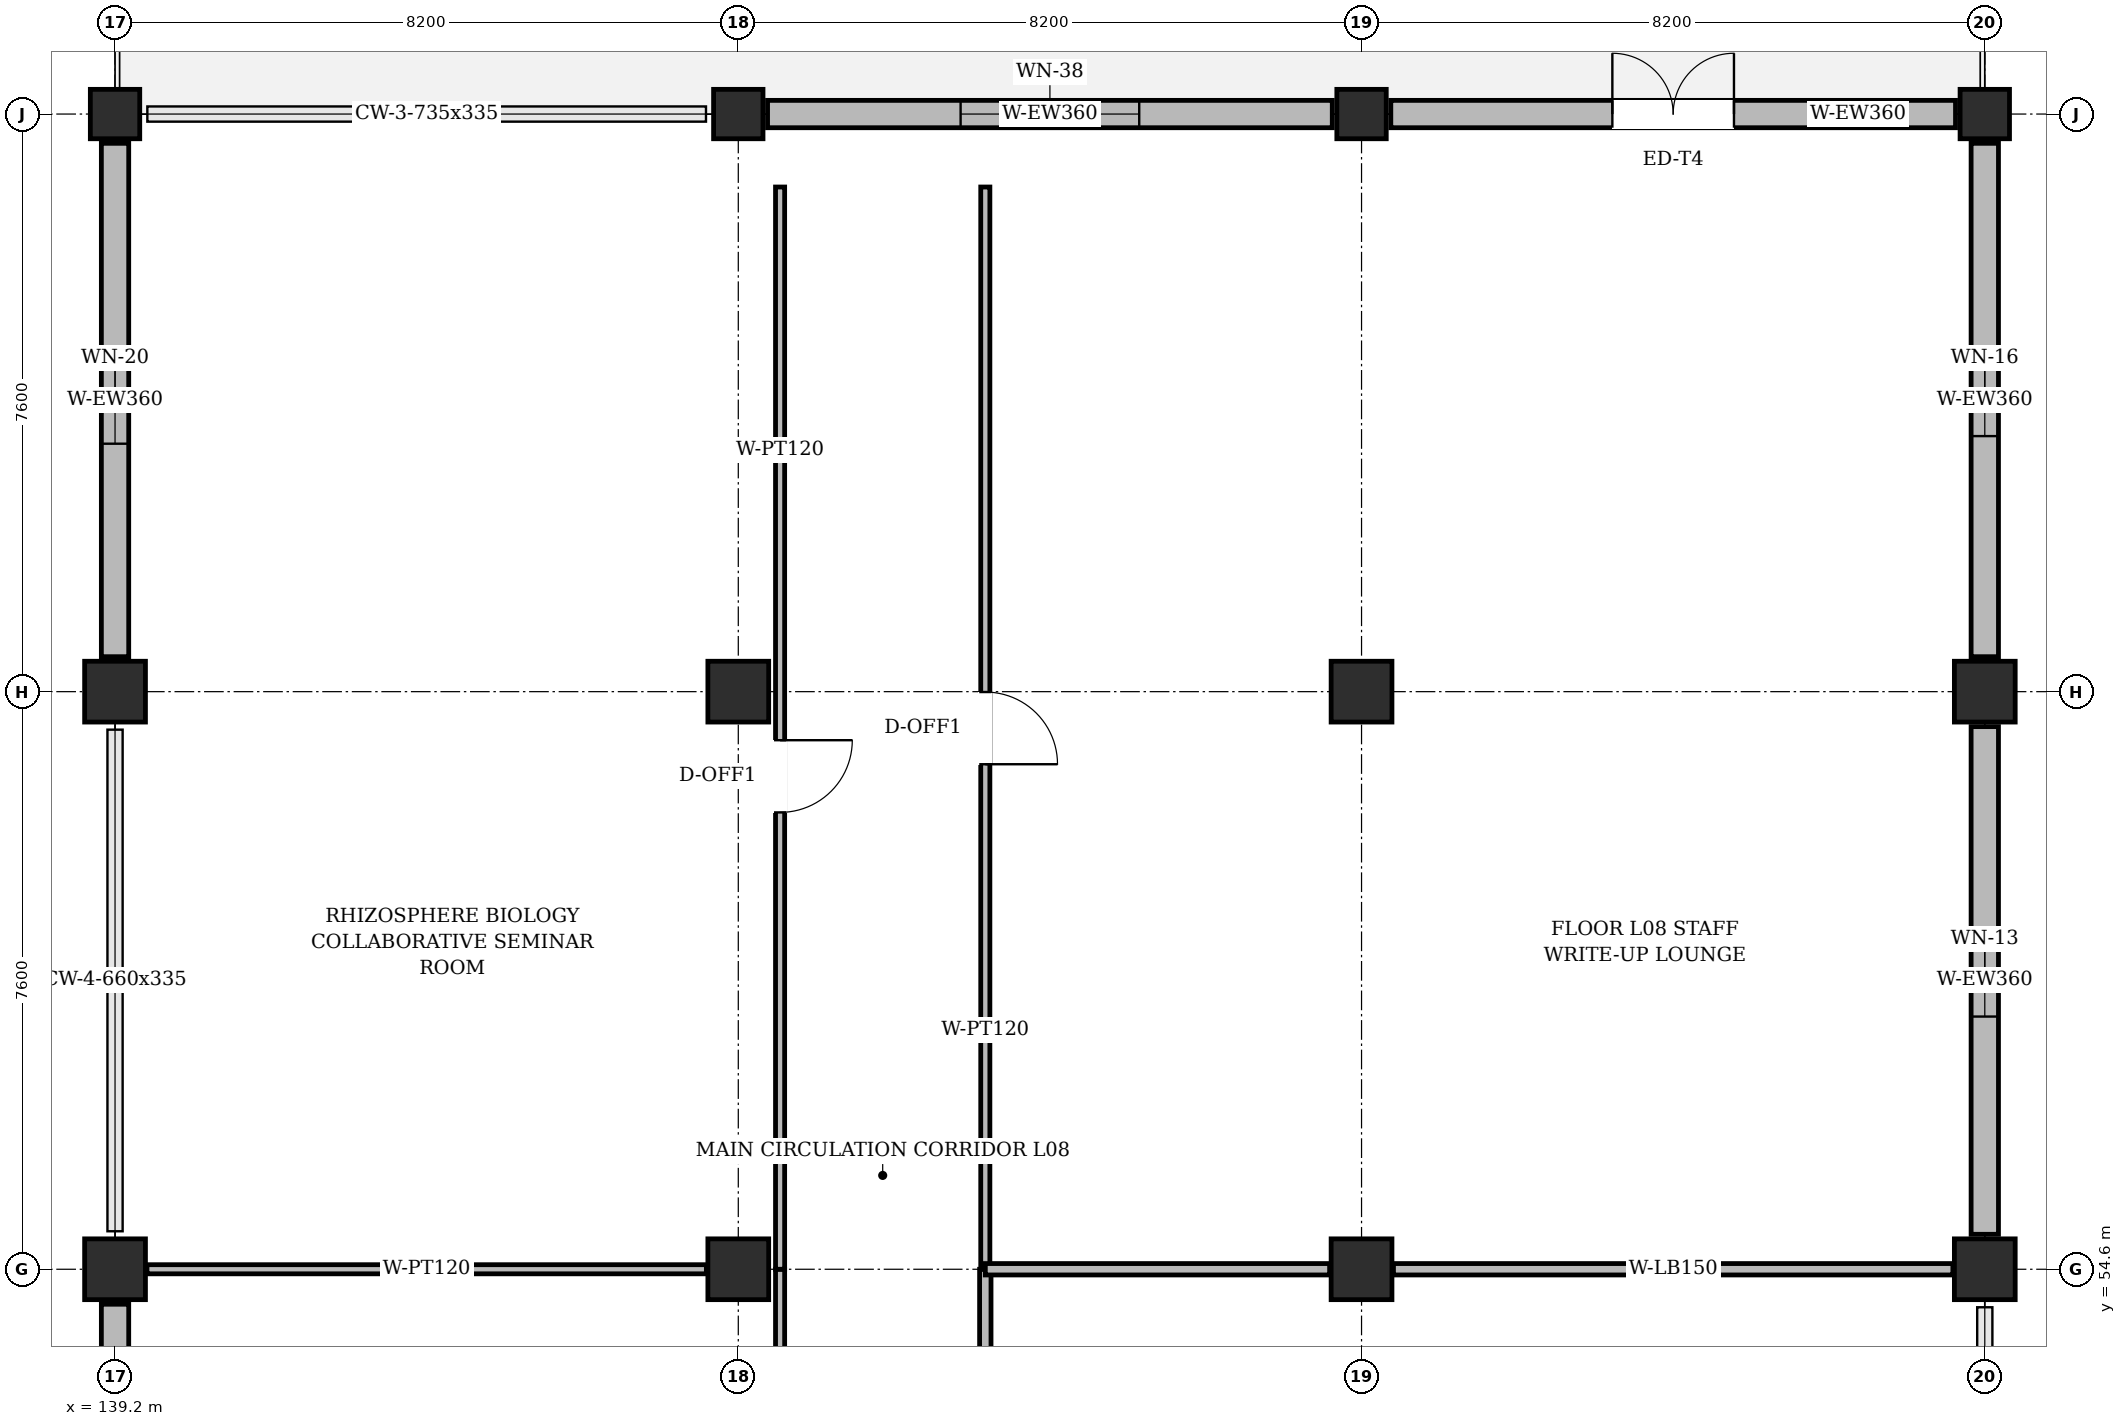
"""IFC4 building model, lengths in metres.
Left out: names, types, materials, properties, quantities, classifications, styles, units other than length and angle.
Written with IfcOpenShell. Run it as: python <this file> out.ifc"""

import sys

from ifc_helpers import new_model, si_unit, direction, frame, frame_2d, origin, origin_2d, place, context, subcontext, project, spatial, rectangle, extrude, element, fill, save


model = new_model("IFC4")
c1 = context("Model", 3, precision=1e-05, world=origin(), true_north=direction((0.0, 1.0)))
c2 = subcontext(c1, "Body", "Model", "MODEL_VIEW")
j1 = project(units=[si_unit("LENGTHUNIT", "METRE"), si_unit("PLANEANGLEUNIT", "RADIAN")], contexts=[c1])
p1 = place(None, origin())
s1 = spatial("IfcSite", under=j1, at=p1, CompositionType="ELEMENT")
p2 = place(p1, origin())
s2 = spatial("IfcBuilding", under=s1, at=p2, CompositionType="ELEMENT")
p3 = place(p2, frame((0.0, 0.0, 36.6)))
s3 = spatial("IfcBuildingStorey", under=s2, at=p3, CompositionType="ELEMENT", Elevation=36.6)
for number, where, z_axis, x_axis in (
    (1, (139.2, 54.6, 0.0), (0.0, 0.0, 1.0), (1.0, 0.0, 0.0)),
    (2, (139.2, 62.2, 0.0), (0.0, 0.0, 1.0), (1.0, 0.0, 0.0)),
):
    element("IfcColumn", number, at=place(p3, frame(where, z_axis=z_axis, x_axis=x_axis)), inside=s3, PredefinedType="COLUMN", context=c2, shape_type="SweptSolid", body=[
        extrude(rectangle(XDim=0.8, YDim=0.8, at=origin_2d()), origin(), (0.0, 0.0, 1.0), 3.95),
    ])
p4 = place(p3, frame((139.2, 69.8, 0.0), z_axis=(0.0, 0.0, 1.0), x_axis=(1.0, 0.0, 0.0)))
e3 = element("IfcColumn", 3, at=p4, inside=s3, PredefinedType="COLUMN", context=c2, shape_type="SweptSolid", body=[
    extrude(rectangle(XDim=0.65, YDim=0.65, at=origin_2d()), origin(), (0.0, 0.0, 1.0), 3.95),
])
for number, where, z_axis, x_axis in (
    (4, (147.4, 54.6, 0.0), (0.0, 0.0, 1.0), (1.0, 0.0, 0.0)),
    (5, (147.4, 62.2, 0.0), (0.0, 0.0, 1.0), (1.0, 0.0, 0.0)),
):
    element("IfcColumn", number, at=place(p3, frame(where, z_axis=z_axis, x_axis=x_axis)), inside=s3, PredefinedType="COLUMN", context=c2, shape_type="SweptSolid", body=[
        extrude(rectangle(XDim=0.8, YDim=0.8, at=origin_2d()), origin(), (0.0, 0.0, 1.0), 3.95),
    ])
p5 = place(p3, frame((147.4, 69.8, 0.0), z_axis=(0.0, 0.0, 1.0), x_axis=(1.0, 0.0, 0.0)))
e6 = element("IfcColumn", 6, at=p5, inside=s3, PredefinedType="COLUMN", context=c2, shape_type="SweptSolid", body=[
    extrude(rectangle(XDim=0.65, YDim=0.65, at=origin_2d()), origin(), (0.0, 0.0, 1.0), 3.95),
])
for number, where, z_axis, x_axis in (
    (7, (155.6, 54.6, 0.0), (0.0, 0.0, 1.0), (1.0, 0.0, 0.0)),
    (8, (155.6, 62.2, 0.0), (0.0, 0.0, 1.0), (1.0, 0.0, 0.0)),
):
    element("IfcColumn", number, at=place(p3, frame(where, z_axis=z_axis, x_axis=x_axis)), inside=s3, PredefinedType="COLUMN", context=c2, shape_type="SweptSolid", body=[
        extrude(rectangle(XDim=0.8, YDim=0.8, at=origin_2d()), origin(), (0.0, 0.0, 1.0), 3.95),
    ])
p6 = place(p3, frame((155.6, 69.8, 0.0), z_axis=(0.0, 0.0, 1.0), x_axis=(1.0, 0.0, 0.0)))
e9 = element("IfcColumn", 9, at=p6, inside=s3, PredefinedType="COLUMN", context=c2, shape_type="SweptSolid", body=[
    extrude(rectangle(XDim=0.65, YDim=0.65, at=origin_2d()), origin(), (0.0, 0.0, 1.0), 3.95),
])
for number, where, z_axis, x_axis in (
    (10, (163.8, 54.6, 0.0), (0.0, 0.0, 1.0), (1.0, 0.0, 0.0)),
    (11, (163.8, 62.2, 0.0), (0.0, 0.0, 1.0), (1.0, 0.0, 0.0)),
):
    element("IfcColumn", number, at=place(p3, frame(where, z_axis=z_axis, x_axis=x_axis)), inside=s3, PredefinedType="COLUMN", context=c2, shape_type="SweptSolid", body=[
        extrude(rectangle(XDim=0.8, YDim=0.8, at=origin_2d()), origin(), (0.0, 0.0, 1.0), 3.95),
    ])
p7 = place(p3, frame((163.8, 69.8, 0.0), z_axis=(0.0, 0.0, 1.0), x_axis=(1.0, 0.0, 0.0)))
e12 = element("IfcColumn", 12, at=p7, inside=s3, PredefinedType="COLUMN", context=c2, shape_type="SweptSolid", body=[
    extrude(rectangle(XDim=0.65, YDim=0.65, at=origin_2d()), origin(), (0.0, 0.0, 1.0), 3.95),
])
p8 = place(p3, frame((163.8, 55.06, 0.0), z_axis=(0.0, 0.0, 1.0), x_axis=(0.0, 1.0, 0.0)))
e13 = element("IfcWall", 13, at=p8, inside=s3, PredefinedType="SOLIDWALL", context=c2, shape_type="SweptSolid", body=[
    extrude(rectangle(XDim=6.68, YDim=0.36, at=frame_2d((3.34, 0.0))), origin(), (0.0, 0.0, 1.0), 3.335),
])
p9 = place(p8, frame((2.865, 0.0, 0.95)))
e14 = element("IfcOpeningElement", 14, at=p9, cuts=e13, PredefinedType="OPENING", context=c2, shape_type="SweptSolid", body=[
    extrude(rectangle(XDim=0.95, YDim=1.25, at=frame_2d((0.475, 0.625))), frame((0.0, 0.192, 0.0), z_axis=(0.0, -1.0, 0.0), x_axis=(1.0, 0.0, 0.0)), (0.0, 0.0, 1.0), 0.384),
])
p10 = place(p3, frame((163.8, 62.66, 0.0), z_axis=(0.0, 0.0, 1.0), x_axis=(0.0, 1.0, 0.0)))
e15 = element("IfcWall", 15, at=p10, inside=s3, PredefinedType="SOLIDWALL", context=c2, shape_type="SweptSolid", body=[
    extrude(rectangle(XDim=6.755, YDim=0.36, at=frame_2d((3.377, 0.0))), origin(), (0.0, 0.0, 1.0), 3.335),
])
p11 = place(p10, frame((2.903, 0.0, 0.95)))
e16 = element("IfcOpeningElement", 16, at=p11, cuts=e15, PredefinedType="OPENING", context=c2, shape_type="SweptSolid", body=[
    extrude(rectangle(XDim=0.95, YDim=2.05, at=frame_2d((0.475, 1.025))), frame((0.0, 0.192, 0.0), z_axis=(0.0, -1.0, 0.0), x_axis=(1.0, 0.0, 0.0)), (0.0, 0.0, 1.0), 0.384),
])
p12 = place(p3, frame((163.415, 69.8, 0.0), z_axis=(0.0, 0.0, 1.0), x_axis=(-1.0, 0.0, 0.0)))
e17 = element("IfcWall", 17, at=p12, inside=s3, PredefinedType="SOLIDWALL", context=c2, shape_type="SweptSolid", body=[
    extrude(rectangle(XDim=7.43, YDim=0.36, at=frame_2d((3.715, 0.0))), origin(), (0.0, 0.0, 1.0), 3.335),
])
p13 = place(p12, frame((2.915, 0.0, 0.0)))
e18 = element("IfcOpeningElement", 18, at=p13, cuts=e17, PredefinedType="OPENING", context=c2, shape_type="SweptSolid", body=[
    extrude(rectangle(XDim=1.6, YDim=2.2, at=frame_2d((0.8, 1.1))), frame((0.0, 0.192, 0.0), z_axis=(0.0, -1.0, 0.0), x_axis=(1.0, 0.0, 0.0)), (0.0, 0.0, 1.0), 0.384),
])
p14 = place(p3, frame((155.215, 69.8, 0.0), z_axis=(0.0, 0.0, 1.0), x_axis=(-1.0, 0.0, 0.0)))
e19 = element("IfcWall", 19, at=p14, inside=s3, PredefinedType="SOLIDWALL", context=c2, shape_type="SweptSolid", body=[
    extrude(rectangle(XDim=7.43, YDim=0.36, at=frame_2d((3.715, 0.0))), origin(), (0.0, 0.0, 1.0), 3.335),
])
p15 = place(p14, frame((2.54, 0.0, 0.95)))
e20 = element("IfcOpeningElement", 20, at=p15, cuts=e19, PredefinedType="OPENING", context=c2, shape_type="SweptSolid", body=[
    extrude(rectangle(XDim=2.35, YDim=1.5, at=frame_2d((1.175, 0.75))), frame((0.0, 0.192, 0.0), z_axis=(0.0, -1.0, 0.0), x_axis=(1.0, 0.0, 0.0)), (0.0, 0.0, 1.0), 0.384),
])
p16 = place(p3, frame((139.2, 69.415, 0.0), z_axis=(0.0, 0.0, 1.0), x_axis=(0.0, -1.0, 0.0)))
e21 = element("IfcWall", 21, at=p16, inside=s3, PredefinedType="SOLIDWALL", context=c2, shape_type="SweptSolid", body=[
    extrude(rectangle(XDim=6.755, YDim=0.36, at=frame_2d((3.377, 0.0))), origin(), (0.0, 0.0, 1.0), 3.335),
])
p17 = place(p16, frame((2.802, 0.0, 0.95)))
e22 = element("IfcOpeningElement", 22, at=p17, cuts=e21, PredefinedType="OPENING", context=c2, shape_type="SweptSolid", body=[
    extrude(rectangle(XDim=1.15, YDim=2.05, at=frame_2d((0.575, 1.025))), frame((0.0, 0.192, 0.0), z_axis=(0.0, -1.0, 0.0), x_axis=(1.0, 0.0, 0.0)), (0.0, 0.0, 1.0), 0.384),
])
p18 = place(p3, frame((139.2, 54.14, 0.0), z_axis=(0.0, 0.0, 1.0), x_axis=(0.0, -1.0, 0.0)))
e23 = element("IfcWall", 23, at=p18, inside=s3, PredefinedType="SOLIDWALL", context=c2, shape_type="SweptSolid", body=[
    extrude(rectangle(XDim=6.68, YDim=0.36, at=frame_2d((3.34, 0.0))), origin(), (0.0, 0.0, 1.0), 3.335),
])
p19 = place(p18, frame((2.565, 0.0, 0.95)))
e24 = element("IfcOpeningElement", 24, at=p19, cuts=e23, PredefinedType="OPENING", context=c2, shape_type="SweptSolid", body=[
    extrude(rectangle(XDim=1.55, YDim=1.5, at=frame_2d((0.775, 0.75))), frame((0.0, 0.192, 0.0), z_axis=(0.0, -1.0, 0.0), x_axis=(1.0, 0.0, 0.0)), (0.0, 0.0, 1.0), 0.384),
])
p20 = place(p3, frame((150.65, 54.6, 0.0), z_axis=(0.0, 0.0, 1.0), x_axis=(0.0, -1.0, 0.0)))
e25 = element("IfcWall", 25, at=p20, inside=s3, PredefinedType="PARTITIONING", context=c2, shape_type="SweptSolid", body=[
    extrude(rectangle(XDim=18.35, YDim=0.15, at=frame_2d((9.175, 0.0))), origin(), (0.0, 0.0, 1.0), 3.805),
])
p21 = place(p20, frame((8.475, 0.0, 0.0)))
e26 = element("IfcOpeningElement", 26, at=p21, cuts=e25, PredefinedType="OPENING", context=c2, shape_type="SweptSolid", body=[
    extrude(rectangle(XDim=1.4, YDim=2.2, at=frame_2d((0.7, 1.1))), frame((0.0, 0.087, 0.0), z_axis=(0.0, -1.0, 0.0), x_axis=(1.0, 0.0, 0.0)), (0.0, 0.0, 1.0), 0.174),
])
p22 = place(p3, frame((147.95, 46.51, 0.0), z_axis=(0.0, 0.0, 1.0), x_axis=(0.0, 1.0, 0.0)))
e27 = element("IfcWall", 27, at=p22, inside=s3, PredefinedType="PARTITIONING", context=c2, shape_type="SweptSolid", body=[
    extrude(rectangle(XDim=8.09, YDim=0.12, at=frame_2d((4.045, 0.0))), origin(), (0.0, 0.0, 1.0), 3.805),
])
p23 = place(p22, frame((3.52, 0.0, 0.0)))
e28 = element("IfcOpeningElement", 28, at=p23, cuts=e27, PredefinedType="OPENING", context=c2, shape_type="SweptSolid", body=[
    extrude(rectangle(XDim=1.05, YDim=2.2, at=frame_2d((0.525, 1.1))), frame((0.0, 0.072, 0.0), z_axis=(0.0, -1.0, 0.0), x_axis=(1.0, 0.0, 0.0)), (0.0, 0.0, 1.0), 0.144),
])
p24 = place(p3, frame((147.95, 54.6, 0.0), z_axis=(0.0, 0.0, 1.0), x_axis=(0.0, 1.0, 0.0)))
e29 = element("IfcWall", 29, at=p24, inside=s3, PredefinedType="PARTITIONING", context=c2, shape_type="SweptSolid", body=[
    extrude(rectangle(XDim=14.24, YDim=0.12, at=frame_2d((7.12, 0.0))), origin(), (0.0, 0.0, 1.0), 3.805),
])
p25 = place(p24, frame((6.011, 0.0, 0.0)))
e30 = element("IfcOpeningElement", 30, at=p25, cuts=e29, PredefinedType="OPENING", context=c2, shape_type="SweptSolid", body=[
    extrude(rectangle(XDim=0.95, YDim=2.2, at=frame_2d((0.475, 1.1))), frame((0.0, 0.072, 0.0), z_axis=(0.0, -1.0, 0.0), x_axis=(1.0, 0.0, 0.0)), (0.0, 0.0, 1.0), 0.144),
])
p26 = place(p3, frame((150.65, 68.84, 0.0), z_axis=(0.0, 0.0, 1.0), x_axis=(0.0, -1.0, 0.0)))
e31 = element("IfcWall", 31, at=p26, inside=s3, PredefinedType="PARTITIONING", context=c2, shape_type="SweptSolid", body=[
    extrude(rectangle(XDim=14.24, YDim=0.12, at=frame_2d((7.12, 0.0))), origin(), (0.0, 0.0, 1.0), 3.805),
])
p27 = place(p26, frame((6.645, 0.0, 0.0)))
e32 = element("IfcOpeningElement", 32, at=p27, cuts=e31, PredefinedType="OPENING", context=c2, shape_type="SweptSolid", body=[
    extrude(rectangle(XDim=0.95, YDim=2.2, at=frame_2d((0.475, 1.1))), frame((0.0, 0.072, 0.0), z_axis=(0.0, -1.0, 0.0), x_axis=(1.0, 0.0, 0.0)), (0.0, 0.0, 1.0), 0.144),
])
p28 = place(p3, frame((150.65, 54.6, 0.0), z_axis=(0.0, 0.0, 1.0), x_axis=(1.0, 0.0, 0.0)))
e33 = element("IfcWall", 33, at=p28, inside=s3, PredefinedType="PARTITIONING", context=c2, shape_type="SweptSolid", body=[
    extrude(rectangle(XDim=4.53, YDim=0.15, at=frame_2d((2.265, 0.0))), origin(), (0.0, 0.0, 1.0), 3.285),
])
p29 = place(p3, frame((156.02, 54.6, 0.0), z_axis=(0.0, 0.0, 1.0), x_axis=(1.0, 0.0, 0.0)))
e34 = element("IfcWall", 34, at=p29, inside=s3, PredefinedType="PARTITIONING", context=c2, shape_type="SweptSolid", body=[
    extrude(rectangle(XDim=7.36, YDim=0.15, at=frame_2d((3.68, 0.0))), origin(), (0.0, 0.0, 1.0), 3.285),
])
p30 = place(p3, frame((139.62, 54.6, 0.0), z_axis=(0.0, 0.0, 1.0), x_axis=(1.0, 0.0, 0.0)))
e35 = element("IfcWall", 35, at=p30, inside=s3, PredefinedType="PARTITIONING", context=c2, shape_type="SweptSolid", body=[
    extrude(rectangle(XDim=7.36, YDim=0.12, at=frame_2d((3.68, 0.0))), origin(), (0.0, 0.0, 1.0), 3.285),
])
p31 = place(p9, origin())
e36 = element("IfcWindow", 36, at=p31, inside=s3, PartitioningType="SINGLE_PANEL", PredefinedType="WINDOW", context=c2, shape_type="SweptSolid", body=[
    extrude(rectangle(XDim=0.95, YDim=1.25, at=frame_2d((0.475, 0.625))), frame((0.0, 0.03, 0.0), z_axis=(0.0, -1.0, 0.0), x_axis=(1.0, 0.0, 0.0)), (0.0, 0.0, 1.0), 0.06),
])
fill(e14, e36)
p32 = place(p11, origin())
e37 = element("IfcWindow", 37, at=p32, inside=s3, PartitioningType="SINGLE_PANEL", PredefinedType="WINDOW", context=c2, shape_type="SweptSolid", body=[
    extrude(rectangle(XDim=0.95, YDim=2.05, at=frame_2d((0.475, 1.025))), frame((0.0, 0.03, 0.0), z_axis=(0.0, -1.0, 0.0), x_axis=(1.0, 0.0, 0.0)), (0.0, 0.0, 1.0), 0.06),
])
fill(e16, e37)
p33 = place(p13, frame((1.6, 0.0, 0.0), z_axis=(0.0, 0.0, 1.0), x_axis=(-1.0, 0.0, 0.0)))
e38 = element("IfcDoor", 38, at=p33, inside=s3, OperationType="DOUBLE_DOOR_SINGLE_SWING", PredefinedType="DOOR", context=c2, shape_type="SweptSolid", body=[
    extrude(rectangle(XDim=1.6, YDim=2.2, at=frame_2d((0.8, 1.1))), frame((0.0, 0.025, 0.0), z_axis=(0.0, -1.0, 0.0), x_axis=(1.0, 0.0, 0.0)), (0.0, 0.0, 1.0), 0.05),
])
fill(e18, e38)
p34 = place(p15, origin())
e39 = element("IfcWindow", 39, at=p34, inside=s3, PartitioningType="DOUBLE_PANEL_VERTICAL", PredefinedType="WINDOW", context=c2, shape_type="SweptSolid", body=[
    extrude(rectangle(XDim=2.35, YDim=1.5, at=frame_2d((1.175, 0.75))), frame((0.0, 0.03, 0.0), z_axis=(0.0, -1.0, 0.0), x_axis=(1.0, 0.0, 0.0)), (0.0, 0.0, 1.0), 0.06),
])
fill(e20, e39)
p35 = place(p17, origin())
e40 = element("IfcWindow", 40, at=p35, inside=s3, PartitioningType="SINGLE_PANEL", PredefinedType="WINDOW", context=c2, shape_type="SweptSolid", body=[
    extrude(rectangle(XDim=1.15, YDim=2.05, at=frame_2d((0.575, 1.025))), frame((0.0, 0.03, 0.0), z_axis=(0.0, -1.0, 0.0), x_axis=(1.0, 0.0, 0.0)), (0.0, 0.0, 1.0), 0.06),
])
fill(e22, e40)
p36 = place(p25, frame((0.95, 0.0, 0.0), z_axis=(0.0, 0.0, 1.0), x_axis=(-1.0, 0.0, 0.0)))
e41 = element("IfcDoor", 41, at=p36, inside=s3, OperationType="SINGLE_SWING_LEFT", PredefinedType="DOOR", context=c2, shape_type="SweptSolid", body=[
    extrude(rectangle(XDim=0.95, YDim=2.2, at=frame_2d((0.475, 1.1))), frame((0.0, 0.025, 0.0), z_axis=(0.0, -1.0, 0.0), x_axis=(1.0, 0.0, 0.0)), (0.0, 0.0, 1.0), 0.05),
])
fill(e30, e41)
p37 = place(p27, origin())
e42 = element("IfcDoor", 42, at=p37, inside=s3, OperationType="SINGLE_SWING_RIGHT", PredefinedType="DOOR", context=c2, shape_type="SweptSolid", body=[
    extrude(rectangle(XDim=0.95, YDim=2.2, at=frame_2d((0.475, 1.1))), frame((0.0, 0.025, 0.0), z_axis=(0.0, -1.0, 0.0), x_axis=(1.0, 0.0, 0.0)), (0.0, 0.0, 1.0), 0.05),
])
fill(e32, e42)
save(model, sys.argv[1])
